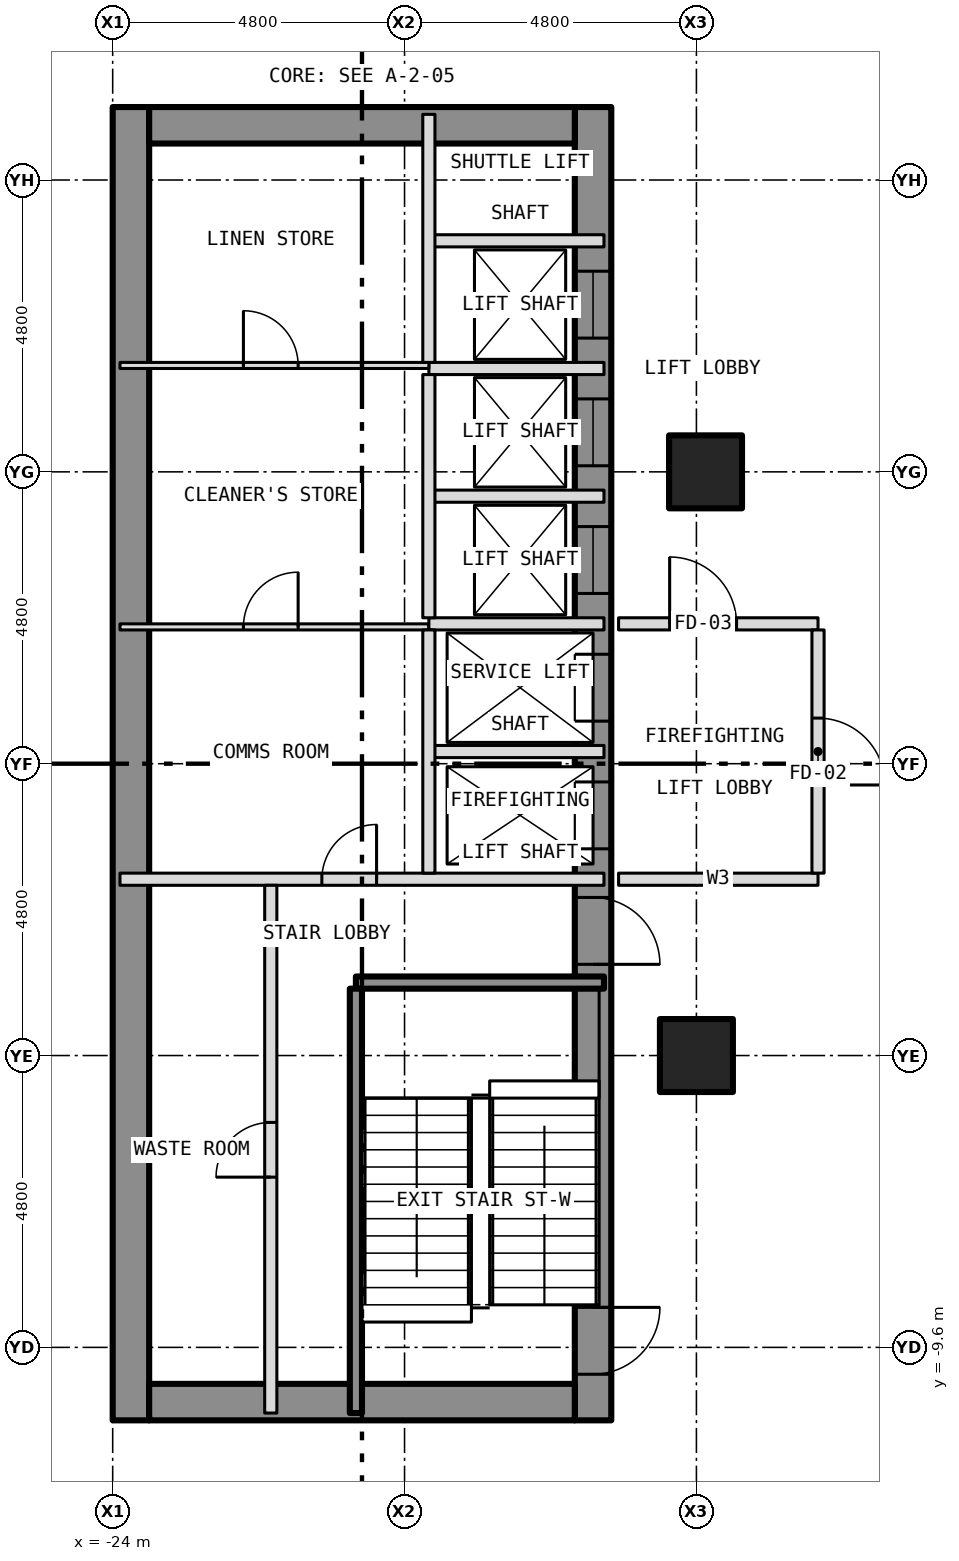
"""IFC4 building model, lengths in metres.
Left out: names, types, materials, properties, quantities, classifications, styles, units other than length and angle.
Written with IfcOpenShell. Run it as: python <this file> out.ifc"""

import sys

from ifc_helpers import new_model, si_unit, direction, frame, frame_2d, origin, origin_2d, place, context, subcontext, project, spatial, rectangle, hollow_rectangle, extrude, element, fill, save


model = new_model("IFC4")
c1 = context("Model", 3, precision=1e-05, world=origin(), true_north=direction((0.0, 1.0)))
c2 = subcontext(c1, "Body", "Model", "MODEL_VIEW")
j1 = project(units=[si_unit("LENGTHUNIT", "METRE"), si_unit("PLANEANGLEUNIT", "RADIAN")], contexts=[c1])
p1 = place(None, origin())
s1 = spatial("IfcSite", under=j1, at=p1, CompositionType="ELEMENT")
p2 = place(p1, origin())
s2 = spatial("IfcBuilding", under=s1, at=p2, CompositionType="ELEMENT")
p3 = place(p2, frame((0.0, 0.0, 15.5)))
s3 = spatial("IfcBuildingStorey", under=s2, at=p3, CompositionType="ELEMENT", Elevation=15.5)
for number, where, z_axis, x_axis in (
    (1, (-14.4, -4.8, -0.2), (0.0, 0.0, 1.0), (1.0, 0.0, 0.0)),
    (2, (-14.25, 4.8, -0.2), (0.0, 0.0, 1.0), (1.0, 0.0, 0.0)),
):
    element("IfcColumn", number, at=place(p3, frame(where, z_axis=z_axis, x_axis=x_axis)), inside=s3, PredefinedType="COLUMN", context=c2, shape_type="SweptSolid", body=[
        extrude(hollow_rectangle(XDim=1.2, YDim=1.2, WallThickness=0.07, at=origin_2d()), origin(), (0.0, 0.0, 1.0), 4.5),
    ])
p4 = place(p3, frame((-16.1, -10.8, 0.0), z_axis=(0.0, 0.0, 1.0), x_axis=(0.0, 1.0, 0.0)))
e3 = element("IfcWall", 3, at=p4, inside=s3, PredefinedType="SHEAR", context=c2, shape_type="SweptSolid", body=[
    extrude(rectangle(XDim=21.6, YDim=0.6, at=frame_2d((10.8, 0.0))), origin(), (0.0, 0.0, 1.0), 4.2),
])
p5 = place(p4, frame((9.4, 0.0, 0.0)))
e4 = element("IfcOpeningElement", 4, at=p5, cuts=e3, PredefinedType="OPENING", context=c2, shape_type="SweptSolid", body=[
    extrude(rectangle(XDim=1.1, YDim=2.1, at=frame_2d((0.55, 1.05))), frame((0.0, 0.312, 0.0), z_axis=(0.0, -1.0, 0.0), x_axis=(1.0, 0.0, 0.0)), (0.0, 0.0, 1.0), 0.624),
])
p6 = place(p4, frame((11.5, 0.0, 0.0)))
e5 = element("IfcOpeningElement", 5, at=p6, cuts=e3, PredefinedType="OPENING", context=c2, shape_type="SweptSolid", body=[
    extrude(rectangle(XDim=1.1, YDim=2.1, at=frame_2d((0.55, 1.05))), frame((0.0, 0.312, 0.0), z_axis=(0.0, -1.0, 0.0), x_axis=(1.0, 0.0, 0.0)), (0.0, 0.0, 1.0), 0.624),
])
p7 = place(p4, frame((13.6, 0.0, 0.0)))
e6 = element("IfcOpeningElement", 6, at=p7, cuts=e3, PredefinedType="OPENING", context=c2, shape_type="SweptSolid", body=[
    extrude(rectangle(XDim=1.1, YDim=2.1, at=frame_2d((0.55, 1.05))), frame((0.0, 0.312, 0.0), z_axis=(0.0, -1.0, 0.0), x_axis=(1.0, 0.0, 0.0)), (0.0, 0.0, 1.0), 0.624),
])
p8 = place(p4, frame((15.7, 0.0, 0.0)))
e7 = element("IfcOpeningElement", 7, at=p8, cuts=e3, PredefinedType="OPENING", context=c2, shape_type="SweptSolid", body=[
    extrude(rectangle(XDim=1.1, YDim=2.1, at=frame_2d((0.55, 1.05))), frame((0.0, 0.312, 0.0), z_axis=(0.0, -1.0, 0.0), x_axis=(1.0, 0.0, 0.0)), (0.0, 0.0, 1.0), 0.624),
])
p9 = place(p4, frame((17.8, 0.0, 0.0)))
e8 = element("IfcOpeningElement", 8, at=p9, cuts=e3, PredefinedType="OPENING", context=c2, shape_type="SweptSolid", body=[
    extrude(rectangle(XDim=1.1, YDim=2.1, at=frame_2d((0.55, 1.05))), frame((0.0, 0.312, 0.0), z_axis=(0.0, -1.0, 0.0), x_axis=(1.0, 0.0, 0.0)), (0.0, 0.0, 1.0), 0.624),
])
p10 = place(p4, frame((0.758, 0.0, 0.0)))
e9 = element("IfcOpeningElement", 9, at=p10, cuts=e3, PredefinedType="OPENING", context=c2, shape_type="SweptSolid", body=[
    extrude(rectangle(XDim=1.1, YDim=2.1, at=frame_2d((0.55, 1.05))), frame((0.0, 0.312, 0.0), z_axis=(0.0, -1.0, 0.0), x_axis=(1.0, 0.0, 0.0)), (0.0, 0.0, 1.0), 0.624),
])
p11 = place(p4, frame((7.5, 0.0, 0.0)))
e10 = element("IfcOpeningElement", 10, at=p11, cuts=e3, PredefinedType="OPENING", context=c2, shape_type="SweptSolid", body=[
    extrude(rectangle(XDim=1.1, YDim=2.1, at=frame_2d((0.55, 1.05))), frame((0.0, 0.312, 0.0), z_axis=(0.0, -1.0, 0.0), x_axis=(1.0, 0.0, 0.0)), (0.0, 0.0, 1.0), 0.624),
])
p12 = place(p3, frame((-23.7, -10.8, 0.0), z_axis=(0.0, 0.0, 1.0), x_axis=(0.0, 1.0, 0.0)))
e11 = element("IfcWall", 11, at=p12, inside=s3, PredefinedType="SHEAR", context=c2, shape_type="SweptSolid", body=[
    extrude(rectangle(XDim=21.6, YDim=0.6, at=frame_2d((10.8, 0.0))), origin(), (0.0, 0.0, 1.0), 4.2),
])
for number, where, z_axis, x_axis in (
    (12, (-23.4, 10.5, 0.0), (0.0, 0.0, 1.0), (1.0, 0.0, 0.0)),
    (13, (-23.4, -10.5, 0.0), (0.0, 0.0, 1.0), (1.0, 0.0, 0.0)),
):
    element("IfcWall", number, at=place(p3, frame(where, z_axis=z_axis, x_axis=x_axis)), inside=s3, PredefinedType="SHEAR", context=c2, shape_type="SweptSolid", body=[
        extrude(rectangle(XDim=7.0, YDim=0.6, at=frame_2d((3.5, 0.0))), origin(), (0.0, 0.0, 1.0), 4.2),
    ])
p13 = place(p3, frame((-20.0, -3.6, 0.0), z_axis=(0.0, 0.0, 1.0), x_axis=(1.0, 0.0, 0.0)))
e14 = element("IfcWall", 14, at=p13, inside=s3, PredefinedType="SHEAR", context=c2, shape_type="SweptSolid", body=[
    extrude(rectangle(XDim=4.08, YDim=0.2, at=frame_2d((2.04, 0.0))), origin(), (0.0, 0.0, 1.0), 4.2),
])
p14 = place(p3, frame((-23.88, -1.9, 0.0), z_axis=(0.0, 0.0, 1.0), x_axis=(1.0, 0.0, 0.0)))
e15 = element("IfcWall", 15, at=p14, inside=s3, PredefinedType="PARTITIONING", context=c2, shape_type="SweptSolid", body=[
    extrude(rectangle(XDim=7.96, YDim=0.2, at=frame_2d((3.98, 0.0))), origin(), (0.0, 0.0, 1.0), 4.2),
])
p15 = place(p14, frame((3.32, 0.0, 0.0)))
e16 = element("IfcOpeningElement", 16, at=p15, cuts=e15, PredefinedType="OPENING", context=c2, shape_type="SweptSolid", body=[
    extrude(rectangle(XDim=0.9, YDim=2.1, at=frame_2d((0.45, 1.05))), frame((0.0, 0.112, 0.0), z_axis=(0.0, -1.0, 0.0), x_axis=(1.0, 0.0, 0.0)), (0.0, 0.0, 1.0), 0.224),
])
p16 = place(p3, frame((-15.68, -1.9, 0.0), z_axis=(0.0, 0.0, 1.0), x_axis=(1.0, 0.0, 0.0)))
e17 = element("IfcWall", 17, at=p16, inside=s3, PredefinedType="PARTITIONING", context=c2, shape_type="SweptSolid", body=[
    extrude(rectangle(XDim=3.28, YDim=0.2, at=frame_2d((1.64, 0.0))), origin(), (0.0, 0.0, 1.0), 4.3),
])
p17 = place(p3, frame((-18.8, 0.2, 0.0), z_axis=(0.0, 0.0, 1.0), x_axis=(1.0, 0.0, 0.0)))
e18 = element("IfcWall", 18, at=p17, inside=s3, PredefinedType="PARTITIONING", context=c2, shape_type="SweptSolid", body=[
    extrude(rectangle(XDim=2.88, YDim=0.2, at=frame_2d((1.44, 0.0))), origin(), (0.0, 0.0, 1.0), 4.2),
])
p18 = place(p3, frame((-23.88, 2.25, 0.0), z_axis=(0.0, 0.0, 1.0), x_axis=(1.0, 0.0, 0.0)))
e19 = element("IfcWall", 19, at=p18, inside=s3, PredefinedType="PARTITIONING", context=c2, shape_type="SweptSolid", body=[
    extrude(rectangle(XDim=5.08, YDim=0.1, at=frame_2d((2.54, 0.0))), origin(), (0.0, 0.0, 1.0), 4.2),
])
p19 = place(p18, frame((2.03, 0.0, 0.0)))
e20 = element("IfcOpeningElement", 20, at=p19, cuts=e19, PredefinedType="OPENING", context=c2, shape_type="SweptSolid", body=[
    extrude(rectangle(XDim=0.9, YDim=2.1, at=frame_2d((0.45, 1.05))), frame((0.0, 0.062, 0.0), z_axis=(0.0, -1.0, 0.0), x_axis=(1.0, 0.0, 0.0)), (0.0, 0.0, 1.0), 0.124),
])
p20 = place(p3, frame((-18.8, 2.3, 0.0), z_axis=(0.0, 0.0, 1.0), x_axis=(1.0, 0.0, 0.0)))
e21 = element("IfcWall", 21, at=p20, inside=s3, PredefinedType="PARTITIONING", context=c2, shape_type="SweptSolid", body=[
    extrude(rectangle(XDim=2.88, YDim=0.2, at=frame_2d((1.44, 0.0))), origin(), (0.0, 0.0, 1.0), 4.2),
])
p21 = place(p3, frame((-15.68, 2.3, 0.0), z_axis=(0.0, 0.0, 1.0), x_axis=(1.0, 0.0, 0.0)))
e22 = element("IfcWall", 22, at=p21, inside=s3, PredefinedType="PARTITIONING", context=c2, shape_type="SweptSolid", body=[
    extrude(rectangle(XDim=3.28, YDim=0.2, at=frame_2d((1.64, 0.0))), origin(), (0.0, 0.0, 1.0), 4.3),
])
p22 = place(p21, frame((0.84, 0.0, 0.0)))
e23 = element("IfcOpeningElement", 23, at=p22, cuts=e22, PredefinedType="OPENING", context=c2, shape_type="SweptSolid", body=[
    extrude(rectangle(XDim=1.1, YDim=2.1, at=frame_2d((0.55, 1.05))), frame((0.0, 0.112, 0.0), z_axis=(0.0, -1.0, 0.0), x_axis=(1.0, 0.0, 0.0)), (0.0, 0.0, 1.0), 0.224),
])
for number, where, z_axis, x_axis in (
    (24, (-18.8, 4.4, 0.0), (0.0, 0.0, 1.0), (1.0, 0.0, 0.0)),
    (25, (-18.8, 6.5, 0.0), (0.0, 0.0, 1.0), (1.0, 0.0, 0.0)),
):
    element("IfcWall", number, at=place(p3, frame(where, z_axis=z_axis, x_axis=x_axis)), inside=s3, PredefinedType="PARTITIONING", context=c2, shape_type="SweptSolid", body=[
        extrude(rectangle(XDim=2.88, YDim=0.2, at=frame_2d((1.44, 0.0))), origin(), (0.0, 0.0, 1.0), 4.2),
    ])
p23 = place(p3, frame((-23.88, 6.55, 0.0), z_axis=(0.0, 0.0, 1.0), x_axis=(1.0, 0.0, 0.0)))
e26 = element("IfcWall", 26, at=p23, inside=s3, PredefinedType="PARTITIONING", context=c2, shape_type="SweptSolid", body=[
    extrude(rectangle(XDim=5.08, YDim=0.1, at=frame_2d((2.54, 0.0))), origin(), (0.0, 0.0, 1.0), 4.2),
])
p24 = place(p23, frame((2.03, 0.0, 0.0)))
e27 = element("IfcOpeningElement", 27, at=p24, cuts=e26, PredefinedType="OPENING", context=c2, shape_type="SweptSolid", body=[
    extrude(rectangle(XDim=0.9, YDim=2.1, at=frame_2d((0.45, 1.05))), frame((0.0, 0.062, 0.0), z_axis=(0.0, -1.0, 0.0), x_axis=(1.0, 0.0, 0.0)), (0.0, 0.0, 1.0), 0.124),
])
p25 = place(p3, frame((-18.8, 8.6, 0.0), z_axis=(0.0, 0.0, 1.0), x_axis=(1.0, 0.0, 0.0)))
e28 = element("IfcWall", 28, at=p25, inside=s3, PredefinedType="PARTITIONING", context=c2, shape_type="SweptSolid", body=[
    extrude(rectangle(XDim=2.88, YDim=0.2, at=frame_2d((1.44, 0.0))), origin(), (0.0, 0.0, 1.0), 4.2),
])
p26 = place(p3, frame((-21.4, -10.68, 0.0), z_axis=(0.0, 0.0, 1.0), x_axis=(0.0, 1.0, 0.0)))
e29 = element("IfcWall", 29, at=p26, inside=s3, PredefinedType="PARTITIONING", context=c2, shape_type="SweptSolid", body=[
    extrude(rectangle(XDim=8.68, YDim=0.2, at=frame_2d((4.34, 0.0))), origin(), (0.0, 0.0, 1.0), 4.2),
])
p27 = place(p26, frame((3.88, 0.0, 0.0)))
e30 = element("IfcOpeningElement", 30, at=p27, cuts=e29, PredefinedType="OPENING", context=c2, shape_type="SweptSolid", body=[
    extrude(rectangle(XDim=0.9, YDim=2.1, at=frame_2d((0.45, 1.05))), frame((0.0, 0.112, 0.0), z_axis=(0.0, -1.0, 0.0), x_axis=(1.0, 0.0, 0.0)), (0.0, 0.0, 1.0), 0.224),
])
p28 = place(p3, frame((-20.0, -10.68, 0.0), z_axis=(0.0, 0.0, 1.0), x_axis=(0.0, 1.0, 0.0)))
e31 = element("IfcWall", 31, at=p28, inside=s3, PredefinedType="SHEAR", context=c2, shape_type="SweptSolid", body=[
    extrude(rectangle(XDim=6.98, YDim=0.2, at=frame_2d((3.49, 0.0))), origin(), (0.0, 0.0, 1.0), 4.2),
])
for number, where, z_axis, x_axis in (
    (32, (-18.8, -1.8, 0.0), (0.0, 0.0, 1.0), (0.0, 1.0, 0.0)),
    (33, (-18.8, 2.4, 0.0), (0.0, 0.0, 1.0), (0.0, 1.0, 0.0)),
):
    element("IfcWall", number, at=place(p3, frame(where, z_axis=z_axis, x_axis=x_axis)), inside=s3, PredefinedType="PARTITIONING", context=c2, shape_type="SweptSolid", body=[
        extrude(rectangle(XDim=4.0, YDim=0.2, at=frame_2d((2.0, 0.0))), origin(), (0.0, 0.0, 1.0), 4.2),
    ])
p29 = place(p3, frame((-18.8, 6.6, 0.0), z_axis=(0.0, 0.0, 1.0), x_axis=(0.0, 1.0, 0.0)))
e34 = element("IfcWall", 34, at=p29, inside=s3, PredefinedType="PARTITIONING", context=c2, shape_type="SweptSolid", body=[
    extrude(rectangle(XDim=4.08, YDim=0.2, at=frame_2d((2.04, 0.0))), origin(), (0.0, 0.0, 1.0), 4.2),
])
p30 = place(p3, frame((-12.4, -1.8, 0.0), z_axis=(0.0, 0.0, 1.0), x_axis=(0.0, 1.0, 0.0)))
e35 = element("IfcWall", 35, at=p30, inside=s3, PredefinedType="PARTITIONING", context=c2, shape_type="SweptSolid", body=[
    extrude(rectangle(XDim=4.0, YDim=0.2, at=frame_2d((2.0, 0.0))), origin(), (0.0, 0.0, 1.0), 4.3),
])
p31 = place(p30, frame((1.45, 0.0, 0.0)))
e36 = element("IfcOpeningElement", 36, at=p31, cuts=e35, PredefinedType="OPENING", context=c2, shape_type="SweptSolid", body=[
    extrude(rectangle(XDim=1.1, YDim=2.1, at=frame_2d((0.55, 1.05))), frame((0.0, 0.112, 0.0), z_axis=(0.0, -1.0, 0.0), x_axis=(1.0, 0.0, 0.0)), (0.0, 0.0, 1.0), 0.224),
])
p32 = place(p5, origin())
e37 = element("IfcDoor", 37, at=p32, inside=s3, OperationType="SLIDING_TO_LEFT", PredefinedType="DOOR", context=c2, shape_type="SweptSolid", body=[
    extrude(rectangle(XDim=1.1, YDim=2.1, at=frame_2d((0.55, 1.05))), frame((0.0, 0.025, 0.0), z_axis=(0.0, -1.0, 0.0), x_axis=(1.0, 0.0, 0.0)), (0.0, 0.0, 1.0), 0.05),
])
fill(e4, e37)
p33 = place(p6, origin())
e38 = element("IfcDoor", 38, at=p33, inside=s3, OperationType="SLIDING_TO_LEFT", PredefinedType="DOOR", context=c2, shape_type="SweptSolid", body=[
    extrude(rectangle(XDim=1.1, YDim=2.1, at=frame_2d((0.55, 1.05))), frame((0.0, 0.025, 0.0), z_axis=(0.0, -1.0, 0.0), x_axis=(1.0, 0.0, 0.0)), (0.0, 0.0, 1.0), 0.05),
])
fill(e5, e38)
p34 = place(p7, origin())
e39 = element("IfcDoor", 39, at=p34, inside=s3, OperationType="SLIDING_TO_LEFT", PredefinedType="DOOR", context=c2, shape_type="SweptSolid", body=[
    extrude(rectangle(XDim=1.1, YDim=2.1, at=frame_2d((0.55, 1.05))), frame((0.0, 0.025, 0.0), z_axis=(0.0, -1.0, 0.0), x_axis=(1.0, 0.0, 0.0)), (0.0, 0.0, 1.0), 0.05),
])
fill(e6, e39)
p35 = place(p8, origin())
e40 = element("IfcDoor", 40, at=p35, inside=s3, OperationType="SLIDING_TO_LEFT", PredefinedType="DOOR", context=c2, shape_type="SweptSolid", body=[
    extrude(rectangle(XDim=1.1, YDim=2.1, at=frame_2d((0.55, 1.05))), frame((0.0, 0.025, 0.0), z_axis=(0.0, -1.0, 0.0), x_axis=(1.0, 0.0, 0.0)), (0.0, 0.0, 1.0), 0.05),
])
fill(e7, e40)
p36 = place(p9, origin())
e41 = element("IfcDoor", 41, at=p36, inside=s3, OperationType="SLIDING_TO_LEFT", PredefinedType="DOOR", context=c2, shape_type="SweptSolid", body=[
    extrude(rectangle(XDim=1.1, YDim=2.1, at=frame_2d((0.55, 1.05))), frame((0.0, 0.025, 0.0), z_axis=(0.0, -1.0, 0.0), x_axis=(1.0, 0.0, 0.0)), (0.0, 0.0, 1.0), 0.05),
])
fill(e8, e41)
p37 = place(p10, origin())
e42 = element("IfcDoor", 42, at=p37, inside=s3, OperationType="SINGLE_SWING_RIGHT", PredefinedType="DOOR", context=c2, shape_type="SweptSolid", body=[
    extrude(rectangle(XDim=1.1, YDim=2.1, at=frame_2d((0.55, 1.05))), frame((0.0, 0.025, 0.0), z_axis=(0.0, -1.0, 0.0), x_axis=(1.0, 0.0, 0.0)), (0.0, 0.0, 1.0), 0.05),
])
fill(e9, e42)
p38 = place(p11, origin())
e43 = element("IfcDoor", 43, at=p38, inside=s3, OperationType="SINGLE_SWING_LEFT", PredefinedType="DOOR", context=c2, shape_type="SweptSolid", body=[
    extrude(rectangle(XDim=1.1, YDim=2.1, at=frame_2d((0.55, 1.05))), frame((0.0, 0.025, 0.0), z_axis=(0.0, -1.0, 0.0), x_axis=(1.0, 0.0, 0.0)), (0.0, 0.0, 1.0), 0.05),
])
fill(e10, e43)
p39 = place(p27, origin())
e44 = element("IfcDoor", 44, at=p39, inside=s3, OperationType="SINGLE_SWING_LEFT", PredefinedType="DOOR", context=c2, shape_type="SweptSolid", body=[
    extrude(rectangle(XDim=0.9, YDim=2.1, at=frame_2d((0.45, 1.05))), frame((0.0, 0.025, 0.0), z_axis=(0.0, -1.0, 0.0), x_axis=(1.0, 0.0, 0.0)), (0.0, 0.0, 1.0), 0.05),
])
fill(e30, e44)
p40 = place(p15, origin())
e45 = element("IfcDoor", 45, at=p40, inside=s3, OperationType="SINGLE_SWING_RIGHT", PredefinedType="DOOR", context=c2, shape_type="SweptSolid", body=[
    extrude(rectangle(XDim=0.9, YDim=2.1, at=frame_2d((0.45, 1.05))), frame((0.0, 0.025, 0.0), z_axis=(0.0, -1.0, 0.0), x_axis=(1.0, 0.0, 0.0)), (0.0, 0.0, 1.0), 0.05),
])
fill(e16, e45)
p41 = place(p19, origin())
e46 = element("IfcDoor", 46, at=p41, inside=s3, OperationType="SINGLE_SWING_RIGHT", PredefinedType="DOOR", context=c2, shape_type="SweptSolid", body=[
    extrude(rectangle(XDim=0.9, YDim=2.1, at=frame_2d((0.45, 1.05))), frame((0.0, 0.025, 0.0), z_axis=(0.0, -1.0, 0.0), x_axis=(1.0, 0.0, 0.0)), (0.0, 0.0, 1.0), 0.05),
])
fill(e20, e46)
p42 = place(p24, origin())
e47 = element("IfcDoor", 47, at=p42, inside=s3, OperationType="SINGLE_SWING_LEFT", PredefinedType="DOOR", context=c2, shape_type="SweptSolid", body=[
    extrude(rectangle(XDim=0.9, YDim=2.1, at=frame_2d((0.45, 1.05))), frame((0.0, 0.025, 0.0), z_axis=(0.0, -1.0, 0.0), x_axis=(1.0, 0.0, 0.0)), (0.0, 0.0, 1.0), 0.05),
])
fill(e27, e47)
p43 = place(p31, origin())
e48 = element("IfcDoor", 48, at=p43, inside=s3, OperationType="SINGLE_SWING_LEFT", PredefinedType="DOOR", context=c2, shape_type="SweptSolid", body=[
    extrude(rectangle(XDim=1.1, YDim=2.1, at=frame_2d((0.55, 1.05))), frame((0.0, 0.025, 0.0), z_axis=(0.0, -1.0, 0.0), x_axis=(1.0, 0.0, 0.0)), (0.0, 0.0, 1.0), 0.05),
])
fill(e36, e48)
p44 = place(p22, origin())
e49 = element("IfcDoor", 49, at=p44, inside=s3, OperationType="SINGLE_SWING_LEFT", PredefinedType="DOOR", context=c2, shape_type="SweptSolid", body=[
    extrude(rectangle(XDim=1.1, YDim=2.1, at=frame_2d((0.55, 1.05))), frame((0.0, 0.025, 0.0), z_axis=(0.0, -1.0, 0.0), x_axis=(1.0, 0.0, 0.0)), (0.0, 0.0, 1.0), 0.05),
])
fill(e23, e49)
save(model, sys.argv[1])
